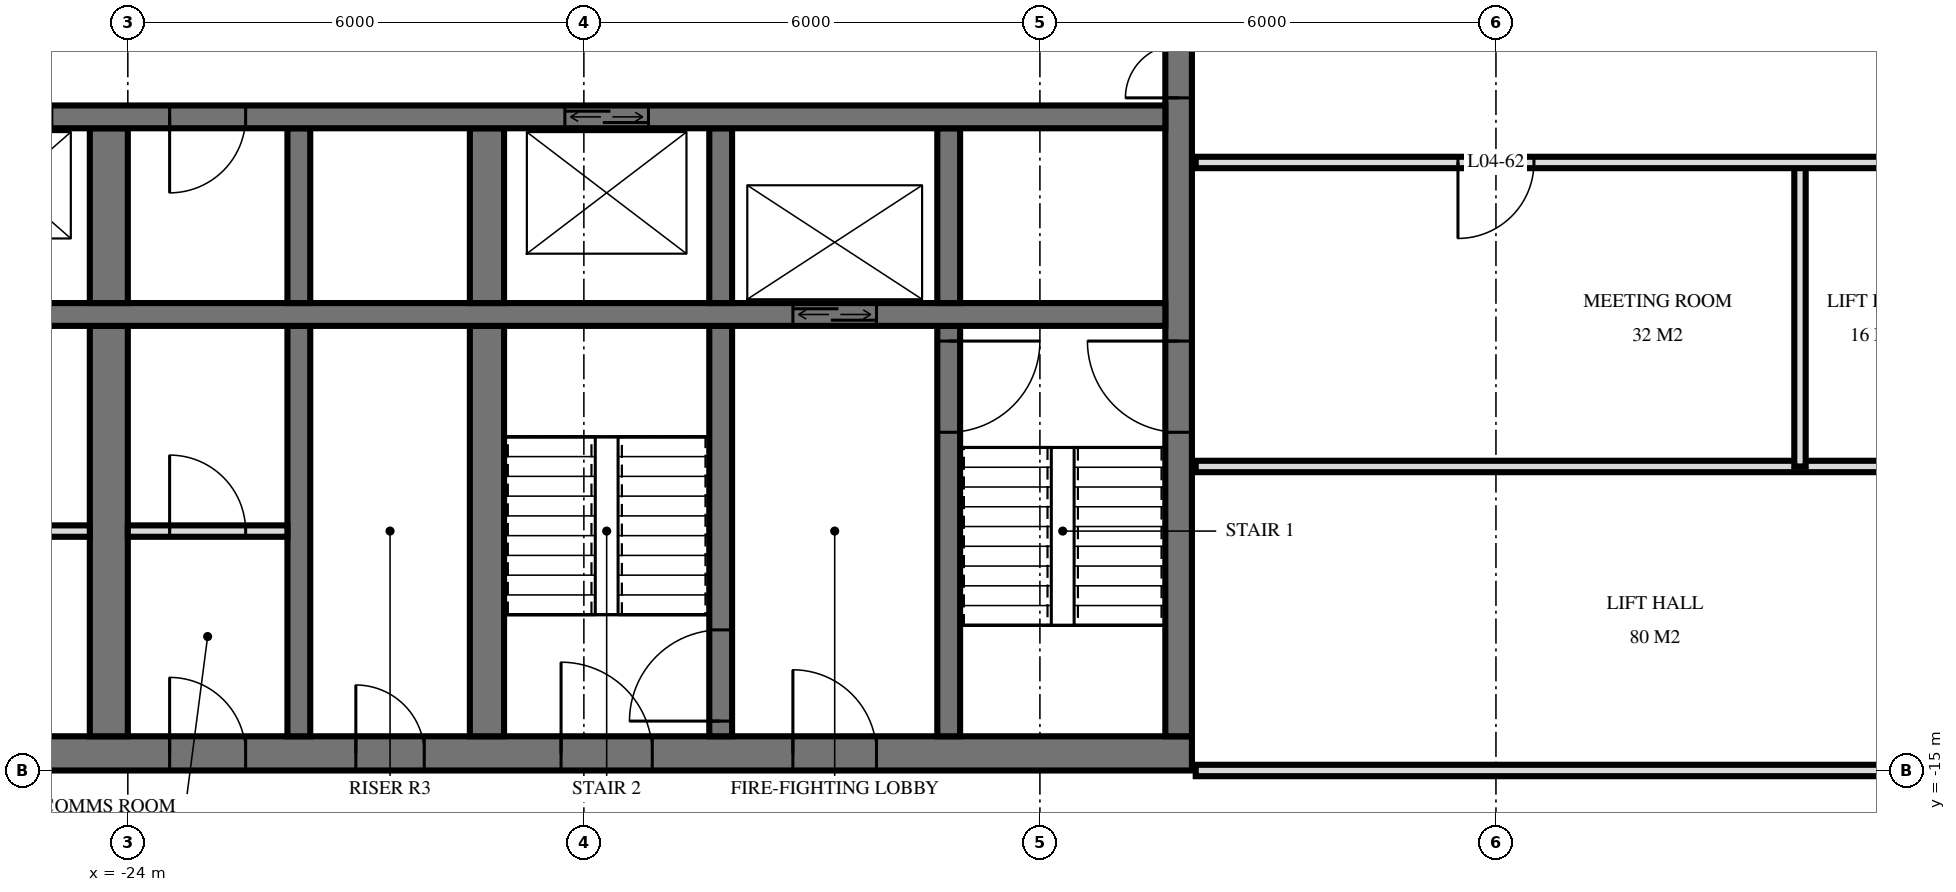
"""IFC4 building model, lengths in metres.
Left out: names, types, materials, properties, quantities, classifications, styles, units other than length and angle.
Written with IfcOpenShell. Run it as: python <this file> out.ifc"""

import sys

from ifc_helpers import new_model, si_unit, direction, frame, frame_2d, origin, place, context, subcontext, project, spatial, rectangle, extrude, element, fill, save


model = new_model("IFC4")
c1 = context("Model", 3, precision=1e-05, world=origin(), true_north=direction((0.0, 1.0)))
c2 = subcontext(c1, "Body", "Model", "MODEL_VIEW")
j1 = project(units=[si_unit("LENGTHUNIT", "METRE"), si_unit("PLANEANGLEUNIT", "RADIAN")], contexts=[c1])
p1 = place(None, origin())
s1 = spatial("IfcSite", under=j1, at=p1, CompositionType="ELEMENT")
p2 = place(p1, origin())
s2 = spatial("IfcBuilding", under=s1, at=p2, CompositionType="ELEMENT")
p3 = place(p2, frame((0.0, 0.0, 24.0)))
s3 = spatial("IfcBuildingStorey", under=s2, at=p3, CompositionType="ELEMENT", Elevation=24.0)
p4 = place(p3, frame((-29.5, -14.775, 0.0), z_axis=(0.0, 0.0, 1.0), x_axis=(1.0, 0.0, 0.0)))
e1 = element("IfcWall", 1, at=p4, inside=s3, PredefinedType="SHEAR", context=c2, shape_type="SweptSolid", body=[
    extrude(rectangle(XDim=19.5, YDim=0.45, at=frame_2d((9.75, 0.0))), origin(), (0.0, 0.0, 1.0), 3.6),
])
p5 = place(p4, frame((11.2, 0.0, 0.0)))
e2 = element("IfcOpeningElement", 2, at=p5, cuts=e1, PredefinedType="OPENING", context=c2, shape_type="SweptSolid", body=[
    extrude(rectangle(XDim=1.2, YDim=2.1, at=frame_2d((0.6, 1.05))), frame((0.0, 0.235, 0.0), z_axis=(0.0, -1.0, 0.0), x_axis=(1.0, 0.0, 0.0)), (0.0, 0.0, 1.0), 0.47),
])
p6 = place(p4, frame((14.25, 0.0, 0.0)))
e3 = element("IfcOpeningElement", 3, at=p6, cuts=e1, PredefinedType="OPENING", context=c2, shape_type="SweptSolid", body=[
    extrude(rectangle(XDim=1.1, YDim=2.1, at=frame_2d((0.55, 1.05))), frame((0.0, 0.235, 0.0), z_axis=(0.0, -1.0, 0.0), x_axis=(1.0, 0.0, 0.0)), (0.0, 0.0, 1.0), 0.47),
])
p7 = place(p4, frame((8.5, 0.0, 0.0)))
e4 = element("IfcOpeningElement", 4, at=p7, cuts=e1, PredefinedType="OPENING", context=c2, shape_type="SweptSolid", body=[
    extrude(rectangle(XDim=0.9, YDim=2.1, at=frame_2d((0.45, 1.05))), frame((0.0, 0.235, 0.0), z_axis=(0.0, -1.0, 0.0), x_axis=(1.0, 0.0, 0.0)), (0.0, 0.0, 1.0), 0.47),
])
p8 = place(p4, frame((6.05, 0.0, 0.0)))
e5 = element("IfcOpeningElement", 5, at=p8, cuts=e1, PredefinedType="OPENING", context=c2, shape_type="SweptSolid", body=[
    extrude(rectangle(XDim=1.0, YDim=2.1, at=frame_2d((0.5, 1.05))), frame((0.0, 0.235, 0.0), z_axis=(0.0, -1.0, 0.0), x_axis=(1.0, 0.0, 0.0)), (0.0, 0.0, 1.0), 0.47),
])
p9 = place(p4, frame((2.25, 0.0, 0.0)))
e6 = element("IfcOpeningElement", 6, at=p9, cuts=e1, PredefinedType="OPENING", context=c2, shape_type="SweptSolid", body=[
    extrude(rectangle(XDim=1.0, YDim=2.1, at=frame_2d((0.5, 1.05))), frame((0.0, 0.235, 0.0), z_axis=(0.0, -1.0, 0.0), x_axis=(1.0, 0.0, 0.0)), (0.0, 0.0, 1.0), 0.47),
])
p10 = place(p3, frame((-10.175, -14.55, 0.0), z_axis=(0.0, 0.0, 1.0), x_axis=(0.0, 1.0, 0.0)))
e7 = element("IfcWall", 7, at=p10, inside=s3, PredefinedType="SHEAR", context=c2, shape_type="SweptSolid", body=[
    extrude(rectangle(XDim=14.1, YDim=0.35, at=frame_2d((7.05, 0.0))), origin(), (0.0, 0.0, 1.0), 3.6),
])
p11 = place(p10, frame((8.4, 0.0, 0.0)))
e8 = element("IfcOpeningElement", 8, at=p11, cuts=e7, PredefinedType="OPENING", context=c2, shape_type="SweptSolid", body=[
    extrude(rectangle(XDim=1.4, YDim=2.4, at=frame_2d((0.7, 1.2))), frame((0.0, 0.185, 0.0), z_axis=(0.0, -1.0, 0.0), x_axis=(1.0, 0.0, 0.0)), (0.0, 0.0, 1.0), 0.37),
])
p12 = place(p10, frame((10.0, 0.0, 0.0)))
e9 = element("IfcOpeningElement", 9, at=p12, cuts=e7, PredefinedType="OPENING", context=c2, shape_type="SweptSolid", body=[
    extrude(rectangle(XDim=1.4, YDim=2.4, at=frame_2d((0.7, 1.2))), frame((0.0, 0.185, 0.0), z_axis=(0.0, -1.0, 0.0), x_axis=(1.0, 0.0, 0.0)), (0.0, 0.0, 1.0), 0.37),
])
p13 = place(p10, frame((4.0, 0.0, 0.0)))
e10 = element("IfcOpeningElement", 10, at=p13, cuts=e7, PredefinedType="OPENING", context=c2, shape_type="SweptSolid", body=[
    extrude(rectangle(XDim=1.2, YDim=2.1, at=frame_2d((0.6, 1.05))), frame((0.0, 0.185, 0.0), z_axis=(0.0, -1.0, 0.0), x_axis=(1.0, 0.0, 0.0)), (0.0, 0.0, 1.0), 0.37),
])
p14 = place(p3, frame((-29.05, -6.4, 0.0), z_axis=(0.0, 0.0, 1.0), x_axis=(1.0, 0.0, 0.0)))
e11 = element("IfcWall", 11, at=p14, inside=s3, PredefinedType="SHEAR", context=c2, shape_type="SweptSolid", body=[
    extrude(rectangle(XDim=18.7, YDim=0.3, at=frame_2d((9.35, 0.0))), origin(), (0.0, 0.0, 1.0), 3.6),
])
p15 = place(p14, frame((2.95, 0.0, 0.0)))
e12 = element("IfcOpeningElement", 12, at=p15, cuts=e11, PredefinedType="OPENING", context=c2, shape_type="SweptSolid", body=[
    extrude(rectangle(XDim=1.1, YDim=2.1, at=frame_2d((0.55, 1.05))), frame((0.0, 0.16, 0.0), z_axis=(0.0, -1.0, 0.0), x_axis=(1.0, 0.0, 0.0)), (0.0, 0.0, 1.0), 0.32),
])
p16 = place(p14, frame((0.55, 0.0, 0.0)))
e13 = element("IfcOpeningElement", 13, at=p16, cuts=e11, PredefinedType="OPENING", context=c2, shape_type="SweptSolid", body=[
    extrude(rectangle(XDim=1.1, YDim=2.1, at=frame_2d((0.55, 1.05))), frame((0.0, 0.16, 0.0), z_axis=(0.0, -1.0, 0.0), x_axis=(1.0, 0.0, 0.0)), (0.0, 0.0, 1.0), 0.32),
])
p17 = place(p14, frame((10.8, 0.0, 0.0)))
e14 = element("IfcOpeningElement", 14, at=p17, cuts=e11, PredefinedType="OPENING", context=c2, shape_type="SweptSolid", body=[
    extrude(rectangle(XDim=1.1, YDim=2.1, at=frame_2d((0.55, 1.05))), frame((0.0, 0.16, 0.0), z_axis=(0.0, -1.0, 0.0), x_axis=(1.0, 0.0, 0.0)), (0.0, 0.0, 1.0), 0.32),
])
p18 = place(p14, frame((5.6, 0.0, 0.0)))
e15 = element("IfcOpeningElement", 15, at=p18, cuts=e11, PredefinedType="OPENING", context=c2, shape_type="SweptSolid", body=[
    extrude(rectangle(XDim=1.0, YDim=2.1, at=frame_2d((0.5, 1.05))), frame((0.0, 0.16, 0.0), z_axis=(0.0, -1.0, 0.0), x_axis=(1.0, 0.0, 0.0)), (0.0, 0.0, 1.0), 0.32),
])
p19 = place(p3, frame((-29.05, -9.0, 0.0), z_axis=(0.0, 0.0, 1.0), x_axis=(1.0, 0.0, 0.0)))
e16 = element("IfcWall", 16, at=p19, inside=s3, PredefinedType="SHEAR", context=c2, shape_type="SweptSolid", body=[
    extrude(rectangle(XDim=18.7, YDim=0.3, at=frame_2d((9.35, 0.0))), origin(), (0.0, 0.0, 1.0), 3.6),
])
p20 = place(p19, frame((13.8, 0.0, 0.0)))
e17 = element("IfcOpeningElement", 17, at=p20, cuts=e16, PredefinedType="OPENING", context=c2, shape_type="SweptSolid", body=[
    extrude(rectangle(XDim=1.1, YDim=2.1, at=frame_2d((0.55, 1.05))), frame((0.0, 0.16, 0.0), z_axis=(0.0, -1.0, 0.0), x_axis=(1.0, 0.0, 0.0)), (0.0, 0.0, 1.0), 0.32),
])
p21 = place(p3, frame((-13.2, -8.85, 0.0), z_axis=(0.0, 0.0, 1.0), x_axis=(0.0, 1.0, 0.0)))
e18 = element("IfcWall", 18, at=p21, inside=s3, PredefinedType="SHEAR", context=c2, shape_type="SweptSolid", body=[
    extrude(rectangle(XDim=2.3, YDim=0.3, at=frame_2d((1.15, 0.0))), origin(), (0.0, 0.0, 1.0), 3.6),
])
p22 = place(p3, frame((-13.2, -14.55, 0.0), z_axis=(0.0, 0.0, 1.0), x_axis=(0.0, 1.0, 0.0)))
e19 = element("IfcWall", 19, at=p22, inside=s3, PredefinedType="SHEAR", context=c2, shape_type="SweptSolid", body=[
    extrude(rectangle(XDim=5.4, YDim=0.3, at=frame_2d((2.7, 0.0))), origin(), (0.0, 0.0, 1.0), 3.6),
])
p23 = place(p22, frame((4.0, 0.0, 0.0)))
e20 = element("IfcOpeningElement", 20, at=p23, cuts=e19, PredefinedType="OPENING", context=c2, shape_type="SweptSolid", body=[
    extrude(rectangle(XDim=1.2, YDim=2.1, at=frame_2d((0.6, 1.05))), frame((0.0, 0.16, 0.0), z_axis=(0.0, -1.0, 0.0), x_axis=(1.0, 0.0, 0.0)), (0.0, 0.0, 1.0), 0.32),
])
p24 = place(p3, frame((-16.2, -8.85, 0.0), z_axis=(0.0, 0.0, 1.0), x_axis=(0.0, 1.0, 0.0)))
e21 = element("IfcWall", 21, at=p24, inside=s3, PredefinedType="SHEAR", context=c2, shape_type="SweptSolid", body=[
    extrude(rectangle(XDim=2.3, YDim=0.3, at=frame_2d((1.15, 0.0))), origin(), (0.0, 0.0, 1.0), 3.6),
])
p25 = place(p3, frame((-16.2, -14.55, 0.0), z_axis=(0.0, 0.0, 1.0), x_axis=(0.0, 1.0, 0.0)))
e22 = element("IfcWall", 22, at=p25, inside=s3, PredefinedType="SHEAR", context=c2, shape_type="SweptSolid", body=[
    extrude(rectangle(XDim=5.4, YDim=0.3, at=frame_2d((2.7, 0.0))), origin(), (0.0, 0.0, 1.0), 3.6),
])
p26 = place(p25, frame((0.2, 0.0, 0.0)))
e23 = element("IfcOpeningElement", 23, at=p26, cuts=e22, PredefinedType="OPENING", context=c2, shape_type="SweptSolid", body=[
    extrude(rectangle(XDim=1.2, YDim=2.1, at=frame_2d((0.6, 1.05))), frame((0.0, 0.16, 0.0), z_axis=(0.0, -1.0, 0.0), x_axis=(1.0, 0.0, 0.0)), (0.0, 0.0, 1.0), 0.32),
])
p27 = place(p3, frame((-19.275, -8.85, 0.0), z_axis=(0.0, 0.0, 1.0), x_axis=(0.0, 1.0, 0.0)))
e24 = element("IfcWall", 24, at=p27, inside=s3, PredefinedType="SHEAR", context=c2, shape_type="SweptSolid", body=[
    extrude(rectangle(XDim=2.3, YDim=0.45, at=frame_2d((1.15, 0.0))), origin(), (0.0, 0.0, 1.0), 3.6),
])
p28 = place(p3, frame((-19.275, -14.55, 0.0), z_axis=(0.0, 0.0, 1.0), x_axis=(0.0, 1.0, 0.0)))
e25 = element("IfcWall", 25, at=p28, inside=s3, PredefinedType="SHEAR", context=c2, shape_type="SweptSolid", body=[
    extrude(rectangle(XDim=5.4, YDim=0.45, at=frame_2d((2.7, 0.0))), origin(), (0.0, 0.0, 1.0), 3.6),
])
p29 = place(p3, frame((-21.75, -8.85, 0.0), z_axis=(0.0, 0.0, 1.0), x_axis=(0.0, 1.0, 0.0)))
e26 = element("IfcWall", 26, at=p29, inside=s3, PredefinedType="SHEAR", context=c2, shape_type="SweptSolid", body=[
    extrude(rectangle(XDim=2.3, YDim=0.3, at=frame_2d((1.15, 0.0))), origin(), (0.0, 0.0, 1.0), 3.6),
])
p30 = place(p3, frame((-21.75, -14.55, 0.0), z_axis=(0.0, 0.0, 1.0), x_axis=(0.0, 1.0, 0.0)))
e27 = element("IfcWall", 27, at=p30, inside=s3, PredefinedType="SHEAR", context=c2, shape_type="SweptSolid", body=[
    extrude(rectangle(XDim=5.4, YDim=0.3, at=frame_2d((2.7, 0.0))), origin(), (0.0, 0.0, 1.0), 3.6),
])
p31 = place(p3, frame((-24.25, -8.85, 0.0), z_axis=(0.0, 0.0, 1.0), x_axis=(0.0, 1.0, 0.0)))
e28 = element("IfcWall", 28, at=p31, inside=s3, PredefinedType="SHEAR", context=c2, shape_type="SweptSolid", body=[
    extrude(rectangle(XDim=2.3, YDim=0.5, at=frame_2d((1.15, 0.0))), origin(), (0.0, 0.0, 1.0), 3.6),
])
p32 = place(p3, frame((-24.25, -14.55, 0.0), z_axis=(0.0, 0.0, 1.0), x_axis=(0.0, 1.0, 0.0)))
e29 = element("IfcWall", 29, at=p32, inside=s3, PredefinedType="SHEAR", context=c2, shape_type="SweptSolid", body=[
    extrude(rectangle(XDim=5.4, YDim=0.5, at=frame_2d((2.7, 0.0))), origin(), (0.0, 0.0, 1.0), 3.6),
])
p33 = place(p3, frame((-24.0, -11.85, 0.0), z_axis=(0.0, 0.0, 1.0), x_axis=(1.0, 0.0, 0.0)))
e30 = element("IfcWall", 30, at=p33, inside=s3, PredefinedType="PARTITIONING", context=c2, shape_type="SweptSolid", body=[
    extrude(rectangle(XDim=2.1, YDim=0.15, at=frame_2d((1.05, 0.0))), origin(), (0.0, 0.0, 1.0), 3.3),
])
p34 = place(p33, frame((0.55, 0.0, 0.0)))
e31 = element("IfcOpeningElement", 31, at=p34, cuts=e30, PredefinedType="OPENING", context=c2, shape_type="SweptSolid", body=[
    extrude(rectangle(XDim=1.0, YDim=2.1, at=frame_2d((0.5, 1.05))), frame((0.0, 0.085, 0.0), z_axis=(0.0, -1.0, 0.0), x_axis=(1.0, 0.0, 0.0)), (0.0, 0.0, 1.0), 0.17),
])
p35 = place(p3, frame((-29.0, -11.85, 0.0), z_axis=(0.0, 0.0, 1.0), x_axis=(1.0, 0.0, 0.0)))
e32 = element("IfcWall", 32, at=p35, inside=s3, PredefinedType="PARTITIONING", context=c2, shape_type="SweptSolid", body=[
    extrude(rectangle(XDim=4.5, YDim=0.15, at=frame_2d((2.25, 0.0))), origin(), (0.0, 0.0, 1.0), 3.3),
])
p36 = place(p35, frame((1.75, 0.0, 0.0)))
e33 = element("IfcOpeningElement", 33, at=p36, cuts=e32, PredefinedType="OPENING", context=c2, shape_type="SweptSolid", body=[
    extrude(rectangle(XDim=1.0, YDim=2.1, at=frame_2d((0.5, 1.05))), frame((0.0, 0.085, 0.0), z_axis=(0.0, -1.0, 0.0), x_axis=(1.0, 0.0, 0.0)), (0.0, 0.0, 1.0), 0.17),
])
p37 = place(p3, frame((-2.0, -11.0, 0.0), z_axis=(0.0, 0.0, 1.0), x_axis=(0.0, 1.0, 0.0)))
e34 = element("IfcWall", 34, at=p37, inside=s3, PredefinedType="PARTITIONING", context=c2, shape_type="SweptSolid", body=[
    extrude(rectangle(XDim=4.0, YDim=0.15, at=frame_2d((2.0, 0.0))), origin(), (0.0, 0.0, 1.0), 3.32),
])
p38 = place(p3, frame((-9.95, -15.0, 0.0), z_axis=(0.0, 0.0, 1.0), x_axis=(1.0, 0.0, 0.0)))
e35 = element("IfcWall", 35, at=p38, inside=s3, PredefinedType="PARTITIONING", context=c2, shape_type="SweptSolid", body=[
    extrude(rectangle(XDim=19.9, YDim=0.15, at=frame_2d((9.95, 0.0))), origin(), (0.0, 0.0, 1.0), 2.684),
])
p39 = place(p38, frame((9.45, 0.0, 0.0)))
e36 = element("IfcOpeningElement", 36, at=p39, cuts=e35, PredefinedType="OPENING", context=c2, shape_type="SweptSolid", body=[
    extrude(rectangle(XDim=1.0, YDim=2.1, at=frame_2d((0.5, 1.05))), frame((0.0, 0.085, 0.0), z_axis=(0.0, -1.0, 0.0), x_axis=(1.0, 0.0, 0.0)), (0.0, 0.0, 1.0), 0.17),
])
p40 = place(p3, frame((-9.95, -11.0, 0.0), z_axis=(0.0, 0.0, 1.0), x_axis=(1.0, 0.0, 0.0)))
e37 = element("IfcWall", 37, at=p40, inside=s3, PredefinedType="PARTITIONING", context=c2, shape_type="SweptSolid", body=[
    extrude(rectangle(XDim=19.9, YDim=0.15, at=frame_2d((9.95, 0.0))), origin(), (0.0, 0.0, 1.0), 3.32),
])
p41 = place(p40, frame((9.45, 0.0, 0.0)))
e38 = element("IfcOpeningElement", 38, at=p41, cuts=e37, PredefinedType="OPENING", context=c2, shape_type="SweptSolid", body=[
    extrude(rectangle(XDim=1.0, YDim=2.1, at=frame_2d((0.5, 1.05))), frame((0.0, 0.085, 0.0), z_axis=(0.0, -1.0, 0.0), x_axis=(1.0, 0.0, 0.0)), (0.0, 0.0, 1.0), 0.17),
])
p42 = place(p40, frame((15.45, 0.0, 0.0)))
e39 = element("IfcOpeningElement", 39, at=p42, cuts=e37, PredefinedType="OPENING", context=c2, shape_type="SweptSolid", body=[
    extrude(rectangle(XDim=1.0, YDim=2.1, at=frame_2d((0.5, 1.05))), frame((0.0, 0.085, 0.0), z_axis=(0.0, -1.0, 0.0), x_axis=(1.0, 0.0, 0.0)), (0.0, 0.0, 1.0), 0.17),
])
p43 = place(p3, frame((-9.95, -7.0, 0.0), z_axis=(0.0, 0.0, 1.0), x_axis=(1.0, 0.0, 0.0)))
e40 = element("IfcWall", 40, at=p43, inside=s3, PredefinedType="PARTITIONING", context=c2, shape_type="SweptSolid", body=[
    extrude(rectangle(XDim=19.9, YDim=0.15, at=frame_2d((9.95, 0.0))), origin(), (0.0, 0.0, 1.0), 3.32),
])
p44 = place(p43, frame((9.45, 0.0, 0.0)))
e41 = element("IfcOpeningElement", 41, at=p44, cuts=e40, PredefinedType="OPENING", context=c2, shape_type="SweptSolid", body=[
    extrude(rectangle(XDim=1.0, YDim=2.1, at=frame_2d((0.5, 1.05))), frame((0.0, 0.085, 0.0), z_axis=(0.0, -1.0, 0.0), x_axis=(1.0, 0.0, 0.0)), (0.0, 0.0, 1.0), 0.17),
])
p45 = place(p43, frame((3.45, 0.0, 0.0)))
e42 = element("IfcOpeningElement", 42, at=p45, cuts=e40, PredefinedType="OPENING", context=c2, shape_type="SweptSolid", body=[
    extrude(rectangle(XDim=1.0, YDim=2.1, at=frame_2d((0.5, 1.05))), frame((0.0, 0.085, 0.0), z_axis=(0.0, -1.0, 0.0), x_axis=(1.0, 0.0, 0.0)), (0.0, 0.0, 1.0), 0.17),
])
p46 = place(p20, origin())
e43 = element("IfcDoor", 43, at=p46, inside=s3, OperationType="DOUBLE_DOOR_SLIDING", PredefinedType="USERDEFINED", context=c2, shape_type="SweptSolid", body=[
    extrude(rectangle(XDim=1.1, YDim=2.1, at=frame_2d((0.55, 1.05))), frame((0.0, 0.025, 0.0), z_axis=(0.0, -1.0, 0.0), x_axis=(1.0, 0.0, 0.0)), (0.0, 0.0, 1.0), 0.05),
])
fill(e17, e43)
p47 = place(p17, origin())
e44 = element("IfcDoor", 44, at=p47, inside=s3, OperationType="DOUBLE_DOOR_SLIDING", PredefinedType="USERDEFINED", context=c2, shape_type="SweptSolid", body=[
    extrude(rectangle(XDim=1.1, YDim=2.1, at=frame_2d((0.55, 1.05))), frame((0.0, 0.025, 0.0), z_axis=(0.0, -1.0, 0.0), x_axis=(1.0, 0.0, 0.0)), (0.0, 0.0, 1.0), 0.05),
])
fill(e14, e44)
p48 = place(p11, origin())
e45 = element("IfcDoor", 45, at=p48, inside=s3, OperationType="DOUBLE_DOOR_SINGLE_SWING", PredefinedType="DOOR", context=c2, shape_type="SweptSolid", body=[
    extrude(rectangle(XDim=1.4, YDim=2.4, at=frame_2d((0.7, 1.2))), frame((0.0, 0.025, 0.0), z_axis=(0.0, -1.0, 0.0), x_axis=(1.0, 0.0, 0.0)), (0.0, 0.0, 1.0), 0.05),
])
fill(e8, e45)
p49 = place(p13, origin())
e46 = element("IfcDoor", 46, at=p49, inside=s3, OperationType="SINGLE_SWING_LEFT", PredefinedType="DOOR", context=c2, shape_type="SweptSolid", body=[
    extrude(rectangle(XDim=1.2, YDim=2.1, at=frame_2d((0.6, 1.05))), frame((0.0, 0.025, 0.0), z_axis=(0.0, -1.0, 0.0), x_axis=(1.0, 0.0, 0.0)), (0.0, 0.0, 1.0), 0.05),
])
fill(e10, e46)
p50 = place(p5, origin())
e47 = element("IfcDoor", 47, at=p50, inside=s3, OperationType="SINGLE_SWING_RIGHT", PredefinedType="DOOR", context=c2, shape_type="SweptSolid", body=[
    extrude(rectangle(XDim=1.2, YDim=2.1, at=frame_2d((0.6, 1.05))), frame((0.0, 0.025, 0.0), z_axis=(0.0, -1.0, 0.0), x_axis=(1.0, 0.0, 0.0)), (0.0, 0.0, 1.0), 0.05),
])
fill(e2, e47)
p51 = place(p6, origin())
e48 = element("IfcDoor", 48, at=p51, inside=s3, OperationType="SINGLE_SWING_RIGHT", PredefinedType="DOOR", context=c2, shape_type="SweptSolid", body=[
    extrude(rectangle(XDim=1.1, YDim=2.1, at=frame_2d((0.55, 1.05))), frame((0.0, 0.025, 0.0), z_axis=(0.0, -1.0, 0.0), x_axis=(1.0, 0.0, 0.0)), (0.0, 0.0, 1.0), 0.05),
])
fill(e3, e48)
p52 = place(p7, origin())
e49 = element("IfcDoor", 49, at=p52, inside=s3, OperationType="SINGLE_SWING_RIGHT", PredefinedType="DOOR", context=c2, shape_type="SweptSolid", body=[
    extrude(rectangle(XDim=0.9, YDim=2.1, at=frame_2d((0.45, 1.05))), frame((0.0, 0.025, 0.0), z_axis=(0.0, -1.0, 0.0), x_axis=(1.0, 0.0, 0.0)), (0.0, 0.0, 1.0), 0.05),
])
fill(e4, e49)
p53 = place(p8, origin())
e50 = element("IfcDoor", 50, at=p53, inside=s3, OperationType="SINGLE_SWING_RIGHT", PredefinedType="DOOR", context=c2, shape_type="SweptSolid", body=[
    extrude(rectangle(XDim=1.0, YDim=2.1, at=frame_2d((0.5, 1.05))), frame((0.0, 0.025, 0.0), z_axis=(0.0, -1.0, 0.0), x_axis=(1.0, 0.0, 0.0)), (0.0, 0.0, 1.0), 0.05),
])
fill(e5, e50)
p54 = place(p18, frame((0.5, 0.0, 0.0), z_axis=(0.0, 0.0, 1.0), x_axis=(-1.0, 0.0, 0.0)))
e51 = element("IfcDoor", 51, at=p54, inside=s3, OperationType="SINGLE_SWING_LEFT", PredefinedType="DOOR", context=c2, shape_type="SweptSolid", body=[
    extrude(rectangle(XDim=1.0, YDim=2.1, at=frame_2d((0.0, 1.05))), frame((0.0, -0.025, 0.0), z_axis=(0.0, 1.0, 0.0), x_axis=(-1.0, 0.0, 0.0)), (0.0, 0.0, 1.0), 0.05),
])
fill(e15, e51)
p55 = place(p23, frame((0.6, 0.0, 0.0), z_axis=(0.0, 0.0, 1.0), x_axis=(-1.0, 0.0, 0.0)))
e52 = element("IfcDoor", 52, at=p55, inside=s3, OperationType="SINGLE_SWING_RIGHT", PredefinedType="DOOR", context=c2, shape_type="SweptSolid", body=[
    extrude(rectangle(XDim=1.2, YDim=2.1, at=frame_2d((0.0, 1.05))), frame((0.0, -0.025, 0.0), z_axis=(0.0, 1.0, 0.0), x_axis=(-1.0, 0.0, 0.0)), (0.0, 0.0, 1.0), 0.05),
])
fill(e20, e52)
p56 = place(p26, origin())
e53 = element("IfcDoor", 53, at=p56, inside=s3, OperationType="SINGLE_SWING_RIGHT", PredefinedType="DOOR", context=c2, shape_type="SweptSolid", body=[
    extrude(rectangle(XDim=1.2, YDim=2.1, at=frame_2d((0.6, 1.05))), frame((0.0, 0.025, 0.0), z_axis=(0.0, -1.0, 0.0), x_axis=(1.0, 0.0, 0.0)), (0.0, 0.0, 1.0), 0.05),
])
fill(e23, e53)
p57 = place(p34, origin())
e54 = element("IfcDoor", 54, at=p57, inside=s3, OperationType="SINGLE_SWING_RIGHT", PredefinedType="DOOR", context=c2, shape_type="SweptSolid", body=[
    extrude(rectangle(XDim=1.0, YDim=2.1, at=frame_2d((0.5, 1.05))), frame((0.0, 0.025, 0.0), z_axis=(0.0, -1.0, 0.0), x_axis=(1.0, 0.0, 0.0)), (0.0, 0.0, 1.0), 0.05),
])
fill(e31, e54)
p58 = place(p45, frame((0.5, 0.0, 0.0), z_axis=(0.0, 0.0, 1.0), x_axis=(-1.0, 0.0, 0.0)))
e55 = element("IfcDoor", 55, at=p58, inside=s3, OperationType="SINGLE_SWING_LEFT", PredefinedType="DOOR", context=c2, shape_type="SweptSolid", body=[
    extrude(rectangle(XDim=1.0, YDim=2.1, at=frame_2d((0.0, 1.05))), frame((0.0, -0.025, 0.0), z_axis=(0.0, 1.0, 0.0), x_axis=(-1.0, 0.0, 0.0)), (0.0, 0.0, 1.0), 0.05),
])
fill(e42, e55)
save(model, sys.argv[1])
